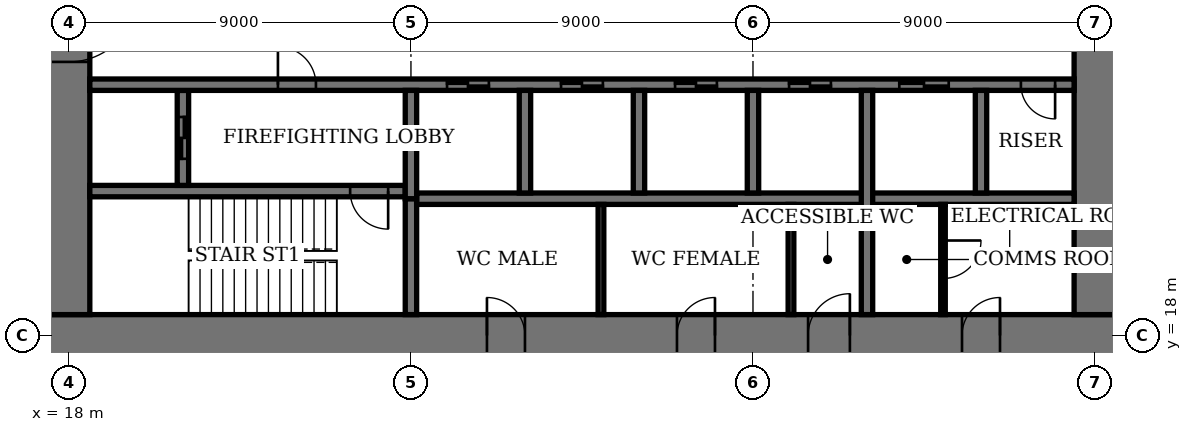
"""IFC4 building model, lengths in metres.
Left out: names, types, materials, properties, quantities, classifications, styles, units other than length and angle.
Written with IfcOpenShell. Run it as: python <this file> out.ifc"""

import sys

from ifc_helpers import new_model, si_unit, direction, frame, frame_2d, origin, place, context, subcontext, project, spatial, rectangle, extrude, element, fill, save


model = new_model("IFC4")
c1 = context("Model", 3, precision=1e-05, world=origin(), true_north=direction((0.0, 1.0)))
c2 = subcontext(c1, "Body", "Model", "MODEL_VIEW")
j1 = project(units=[si_unit("LENGTHUNIT", "METRE"), si_unit("PLANEANGLEUNIT", "RADIAN")], contexts=[c1])
p1 = place(None, origin())
s1 = spatial("IfcSite", under=j1, at=p1, CompositionType="ELEMENT")
p2 = place(p1, origin())
s2 = spatial("IfcBuilding", under=s1, at=p2, CompositionType="ELEMENT")
p3 = place(p2, frame((0.0, 0.0, 31.8)))
s3 = spatial("IfcBuildingStorey", under=s2, at=p3, CompositionType="ELEMENT", Elevation=31.8)
p4 = place(p3, frame((17.45, 18.0, 0.0), z_axis=(0.0, 0.0, 1.0), x_axis=(1.0, 0.0, 0.0)))
e1 = element("IfcWall", 1, at=p4, inside=s3, PredefinedType="SHEAR", context=c2, shape_type="SweptSolid", body=[
    extrude(rectangle(XDim=28.1, YDim=1.1, at=frame_2d((14.05, 0.0))), origin(), (0.0, 0.0, 1.0), 4.0),
])
p5 = place(p4, frame((11.55, 0.0, 0.0)))
e2 = element("IfcOpeningElement", 2, at=p5, cuts=e1, PredefinedType="OPENING", context=c2, shape_type="SweptSolid", body=[
    extrude(rectangle(XDim=1.0, YDim=2.4, at=frame_2d((0.5, 1.2))), frame((0.0, 0.56, 0.0), z_axis=(0.0, -1.0, 0.0), x_axis=(1.0, 0.0, 0.0)), (0.0, 0.0, 1.0), 1.12),
])
p6 = place(p4, frame((16.55, 0.0, 0.0)))
e3 = element("IfcOpeningElement", 3, at=p6, cuts=e1, PredefinedType="OPENING", context=c2, shape_type="SweptSolid", body=[
    extrude(rectangle(XDim=1.0, YDim=2.4, at=frame_2d((0.5, 1.2))), frame((0.0, 0.56, 0.0), z_axis=(0.0, -1.0, 0.0), x_axis=(1.0, 0.0, 0.0)), (0.0, 0.0, 1.0), 1.12),
])
p7 = place(p4, frame((20.0, 0.0, 0.0)))
e4 = element("IfcOpeningElement", 4, at=p7, cuts=e1, PredefinedType="OPENING", context=c2, shape_type="SweptSolid", body=[
    extrude(rectangle(XDim=1.1, YDim=2.4, at=frame_2d((0.55, 1.2))), frame((0.0, 0.56, 0.0), z_axis=(0.0, -1.0, 0.0), x_axis=(1.0, 0.0, 0.0)), (0.0, 0.0, 1.0), 1.12),
])
p8 = place(p4, frame((24.05, 0.0, 0.0)))
e5 = element("IfcOpeningElement", 5, at=p8, cuts=e1, PredefinedType="OPENING", context=c2, shape_type="SweptSolid", body=[
    extrude(rectangle(XDim=1.0, YDim=2.4, at=frame_2d((0.5, 1.2))), frame((0.0, 0.56, 0.0), z_axis=(0.0, -1.0, 0.0), x_axis=(1.0, 0.0, 0.0)), (0.0, 0.0, 1.0), 1.12),
])
p9 = place(p3, frame((18.0, 35.45, 0.0), z_axis=(0.0, 0.0, 1.0), x_axis=(0.0, -1.0, 0.0)))
e6 = element("IfcWall", 6, at=p9, inside=s3, PredefinedType="SHEAR", context=c2, shape_type="SweptSolid", body=[
    extrude(rectangle(XDim=16.9, YDim=1.1, at=frame_2d((8.45, 0.0))), origin(), (0.0, 0.0, 1.0), 4.0),
])
p10 = place(p9, frame((8.45, 0.0, 0.0)))
e7 = element("IfcOpeningElement", 7, at=p10, cuts=e6, PredefinedType="OPENING", context=c2, shape_type="SweptSolid", body=[
    extrude(rectangle(XDim=1.8, YDim=2.4, at=frame_2d((0.9, 1.2))), frame((0.0, 0.56, 0.0), z_axis=(0.0, -1.0, 0.0), x_axis=(1.0, 0.0, 0.0)), (0.0, 0.0, 1.0), 1.12),
])
p11 = place(p3, frame((45.0, 18.55, 0.0), z_axis=(0.0, 0.0, 1.0), x_axis=(0.0, 1.0, 0.0)))
e8 = element("IfcWall", 8, at=p11, inside=s3, PredefinedType="SHEAR", context=c2, shape_type="SweptSolid", body=[
    extrude(rectangle(XDim=16.9, YDim=1.1, at=frame_2d((8.45, 0.0))), origin(), (0.0, 0.0, 1.0), 4.0),
])
p12 = place(p11, frame((8.45, 0.0, 0.0)))
e9 = element("IfcOpeningElement", 9, at=p12, cuts=e8, PredefinedType="OPENING", context=c2, shape_type="SweptSolid", body=[
    extrude(rectangle(XDim=1.8, YDim=2.4, at=frame_2d((0.9, 1.2))), frame((0.0, 0.56, 0.0), z_axis=(0.0, -1.0, 0.0), x_axis=(1.0, 0.0, 0.0)), (0.0, 0.0, 1.0), 1.12),
])
p13 = place(p3, frame((18.55, 21.8, 0.0), z_axis=(0.0, 0.0, 1.0), x_axis=(1.0, 0.0, 0.0)))
e10 = element("IfcWall", 10, at=p13, inside=s3, PredefinedType="SHEAR", context=c2, shape_type="SweptSolid", body=[
    extrude(rectangle(XDim=8.3, YDim=0.3, at=frame_2d((4.15, 0.0))), origin(), (0.0, 0.0, 1.0), 4.0),
])
p14 = place(p13, frame((6.85, 0.0, 0.0)))
e11 = element("IfcOpeningElement", 11, at=p14, cuts=e10, PredefinedType="OPENING", context=c2, shape_type="SweptSolid", body=[
    extrude(rectangle(XDim=1.0, YDim=2.4, at=frame_2d((0.5, 1.2))), frame((0.0, 0.16, 0.0), z_axis=(0.0, -1.0, 0.0), x_axis=(1.0, 0.0, 0.0)), (0.0, 0.0, 1.0), 0.32),
])
p15 = place(p3, frame((27.0, 18.55, 0.0), z_axis=(0.0, 0.0, 1.0), x_axis=(0.0, 1.0, 0.0)))
e12 = element("IfcWall", 12, at=p15, inside=s3, PredefinedType="SHEAR", context=c2, shape_type="SweptSolid", body=[
    extrude(rectangle(XDim=3.05, YDim=0.3, at=frame_2d((1.525, 0.0))), origin(), (0.0, 0.0, 1.0), 4.0),
])
p16 = place(p3, frame((21.0, 21.95, 0.0), z_axis=(0.0, 0.0, 1.0), x_axis=(0.0, 1.0, 0.0)))
e13 = element("IfcWall", 13, at=p16, inside=s3, PredefinedType="SHEAR", context=c2, shape_type="SweptSolid", body=[
    extrude(rectangle(XDim=2.5, YDim=0.3, at=frame_2d((1.25, 0.0))), origin(), (0.0, 0.0, 1.0), 4.0),
])
p17 = place(p16, frame((0.7, 0.0, 0.0)))
e14 = element("IfcOpeningElement", 14, at=p17, cuts=e13, PredefinedType="OPENING", context=c2, shape_type="SweptSolid", body=[
    extrude(rectangle(XDim=1.1, YDim=2.4, at=frame_2d((0.55, 1.2))), frame((0.0, 0.16, 0.0), z_axis=(0.0, -1.0, 0.0), x_axis=(1.0, 0.0, 0.0)), (0.0, 0.0, 1.0), 0.32),
])
p18 = place(p3, frame((18.55, 24.6, 0.0), z_axis=(0.0, 0.0, 1.0), x_axis=(1.0, 0.0, 0.0)))
e15 = element("IfcWall", 15, at=p18, inside=s3, PredefinedType="SHEAR", context=c2, shape_type="SweptSolid", body=[
    extrude(rectangle(XDim=25.9, YDim=0.3, at=frame_2d((12.95, 0.0))), origin(), (0.0, 0.0, 1.0), 4.0),
])
p19 = place(p18, frame((4.95, 0.0, 0.0)))
e16 = element("IfcOpeningElement", 16, at=p19, cuts=e15, PredefinedType="OPENING", context=c2, shape_type="SweptSolid", body=[
    extrude(rectangle(XDim=1.0, YDim=2.4, at=frame_2d((0.5, 1.2))), frame((0.0, 0.16, 0.0), z_axis=(0.0, -1.0, 0.0), x_axis=(1.0, 0.0, 0.0)), (0.0, 0.0, 1.0), 0.32),
])
p20 = place(p18, frame((24.5, 0.0, 0.0)))
e17 = element("IfcOpeningElement", 17, at=p20, cuts=e15, PredefinedType="OPENING", context=c2, shape_type="SweptSolid", body=[
    extrude(rectangle(XDim=0.9, YDim=2.1, at=frame_2d((0.45, 1.05))), frame((0.0, 0.16, 0.0), z_axis=(0.0, -1.0, 0.0), x_axis=(1.0, 0.0, 0.0)), (0.0, 0.0, 1.0), 0.32),
])
p21 = place(p18, frame((9.4, 0.0, 0.0)))
e18 = element("IfcOpeningElement", 18, at=p21, cuts=e15, PredefinedType="OPENING", context=c2, shape_type="SweptSolid", body=[
    extrude(rectangle(XDim=1.1, YDim=2.4, at=frame_2d((0.55, 1.2))), frame((0.0, 0.16, 0.0), z_axis=(0.0, -1.0, 0.0), x_axis=(1.0, 0.0, 0.0)), (0.0, 0.0, 1.0), 0.32),
])
p22 = place(p18, frame((12.4, 0.0, 0.0)))
e19 = element("IfcOpeningElement", 19, at=p22, cuts=e15, PredefinedType="OPENING", context=c2, shape_type="SweptSolid", body=[
    extrude(rectangle(XDim=1.1, YDim=2.4, at=frame_2d((0.55, 1.2))), frame((0.0, 0.16, 0.0), z_axis=(0.0, -1.0, 0.0), x_axis=(1.0, 0.0, 0.0)), (0.0, 0.0, 1.0), 0.32),
])
p23 = place(p18, frame((15.4, 0.0, 0.0)))
e20 = element("IfcOpeningElement", 20, at=p23, cuts=e15, PredefinedType="OPENING", context=c2, shape_type="SweptSolid", body=[
    extrude(rectangle(XDim=1.1, YDim=2.4, at=frame_2d((0.55, 1.2))), frame((0.0, 0.16, 0.0), z_axis=(0.0, -1.0, 0.0), x_axis=(1.0, 0.0, 0.0)), (0.0, 0.0, 1.0), 0.32),
])
p24 = place(p18, frame((18.4, 0.0, 0.0)))
e21 = element("IfcOpeningElement", 21, at=p24, cuts=e15, PredefinedType="OPENING", context=c2, shape_type="SweptSolid", body=[
    extrude(rectangle(XDim=1.1, YDim=2.4, at=frame_2d((0.55, 1.2))), frame((0.0, 0.16, 0.0), z_axis=(0.0, -1.0, 0.0), x_axis=(1.0, 0.0, 0.0)), (0.0, 0.0, 1.0), 0.32),
])
p25 = place(p18, frame((21.3, 0.0, 0.0)))
e22 = element("IfcOpeningElement", 22, at=p25, cuts=e15, PredefinedType="OPENING", context=c2, shape_type="SweptSolid", body=[
    extrude(rectangle(XDim=1.3, YDim=2.4, at=frame_2d((0.65, 1.2))), frame((0.0, 0.16, 0.0), z_axis=(0.0, -1.0, 0.0), x_axis=(1.0, 0.0, 0.0)), (0.0, 0.0, 1.0), 0.32),
])
p26 = place(p3, frame((27.15, 21.6, 0.0), z_axis=(0.0, 0.0, 1.0), x_axis=(1.0, 0.0, 0.0)))
e23 = element("IfcWall", 23, at=p26, inside=s3, PredefinedType="SHEAR", context=c2, shape_type="SweptSolid", body=[
    extrude(rectangle(XDim=17.3, YDim=0.3, at=frame_2d((8.65, 0.0))), origin(), (0.0, 0.0, 1.0), 4.0),
])
for number, where, z_axis, x_axis in (
    (24, (30.0, 21.75, 0.0), (0.0, 0.0, 1.0), (0.0, 1.0, 0.0)),
    (25, (33.0, 21.75, 0.0), (0.0, 0.0, 1.0), (0.0, 1.0, 0.0)),
    (26, (36.0, 21.75, 0.0), (0.0, 0.0, 1.0), (0.0, 1.0, 0.0)),
):
    element("IfcWall", number, at=place(p3, frame(where, z_axis=z_axis, x_axis=x_axis)), inside=s3, PredefinedType="SHEAR", context=c2, shape_type="SweptSolid", body=[
        extrude(rectangle(XDim=2.7, YDim=0.3, at=frame_2d((1.35, 0.0))), origin(), (0.0, 0.0, 1.0), 4.0),
    ])
p27 = place(p3, frame((39.0, 18.55, 0.0), z_axis=(0.0, 0.0, 1.0), x_axis=(0.0, 1.0, 0.0)))
e27 = element("IfcWall", 27, at=p27, inside=s3, PredefinedType="SHEAR", context=c2, shape_type="SweptSolid", body=[
    extrude(rectangle(XDim=5.9, YDim=0.3, at=frame_2d((2.95, 0.0))), origin(), (0.0, 0.0, 1.0), 4.0),
])
p28 = place(p3, frame((42.0, 21.75, 0.0), z_axis=(0.0, 0.0, 1.0), x_axis=(0.0, 1.0, 0.0)))
e28 = element("IfcWall", 28, at=p28, inside=s3, PredefinedType="SHEAR", context=c2, shape_type="SweptSolid", body=[
    extrude(rectangle(XDim=2.7, YDim=0.3, at=frame_2d((1.35, 0.0))), origin(), (0.0, 0.0, 1.0), 4.0),
])
p29 = place(p3, frame((27.0, 21.6, 0.0), z_axis=(0.0, 0.0, 1.0), x_axis=(0.0, 1.0, 0.0)))
e29 = element("IfcWall", 29, at=p29, inside=s3, PredefinedType="SHEAR", context=c2, shape_type="SweptSolid", body=[
    extrude(rectangle(XDim=2.85, YDim=0.3, at=frame_2d((1.425, 0.0))), origin(), (0.0, 0.0, 1.0), 4.0),
])
for number, where, z_axis, x_axis in (
    (30, (32.0, 18.55, 0.0), (0.0, 0.0, 1.0), (0.0, 1.0, 0.0)),
    (31, (37.0, 18.55, 0.0), (0.0, 0.0, 1.0), (0.0, 1.0, 0.0)),
):
    element("IfcWall", number, at=place(p3, frame(where, z_axis=z_axis, x_axis=x_axis)), inside=s3, PredefinedType="PARTITIONING", context=c2, shape_type="SweptSolid", body=[
        extrude(rectangle(XDim=2.9, YDim=0.15, at=frame_2d((1.45, 0.0))), origin(), (0.0, 0.0, 1.0), 3.75),
    ])
p30 = place(p3, frame((41.0, 18.55, 0.0), z_axis=(0.0, 0.0, 1.0), x_axis=(0.0, 1.0, 0.0)))
e32 = element("IfcWall", 32, at=p30, inside=s3, PredefinedType="PARTITIONING", context=c2, shape_type="SweptSolid", body=[
    extrude(rectangle(XDim=2.9, YDim=0.12, at=frame_2d((1.45, 0.0))), origin(), (0.0, 0.0, 1.0), 3.75),
])
p31 = place(p30, frame((0.95, 0.0, 0.0)))
e33 = element("IfcOpeningElement", 33, at=p31, cuts=e32, PredefinedType="OPENING", context=c2, shape_type="SweptSolid", body=[
    extrude(rectangle(XDim=1.0, YDim=2.4, at=frame_2d((0.5, 1.2))), frame((0.0, 0.07, 0.0), z_axis=(0.0, -1.0, 0.0), x_axis=(1.0, 0.0, 0.0)), (0.0, 0.0, 1.0), 0.14),
])
p32 = place(p10, origin())
e34 = element("IfcDoor", 34, at=p32, inside=s3, OperationType="DOUBLE_DOOR_DOUBLE_SWING", PredefinedType="DOOR", context=c2, shape_type="SweptSolid", body=[
    extrude(rectangle(XDim=1.8, YDim=2.4, at=frame_2d((0.9, 1.2))), frame((0.0, 0.03, 0.0), z_axis=(0.0, -1.0, 0.0), x_axis=(1.0, 0.0, 0.0)), (0.0, 0.0, 1.0), 0.06),
    extrude(rectangle(XDim=0.04, YDim=2.4, at=frame_2d((0.02, 1.2))), frame((0.0, 0.55, 0.0), z_axis=(0.0, -1.0, 0.0), x_axis=(1.0, 0.0, 0.0)), (0.0, 0.0, 1.0), 1.1),
    extrude(rectangle(XDim=0.04, YDim=2.4, at=frame_2d((1.78, 1.2))), frame((0.0, 0.55, 0.0), z_axis=(0.0, -1.0, 0.0), x_axis=(1.0, 0.0, 0.0)), (0.0, 0.0, 1.0), 1.1),
    extrude(rectangle(XDim=1.8, YDim=0.04, at=frame_2d((0.9, 2.38))), frame((0.0, 0.55, 0.0), z_axis=(0.0, -1.0, 0.0), x_axis=(1.0, 0.0, 0.0)), (0.0, 0.0, 1.0), 1.1),
])
fill(e7, e34)
p33 = place(p5, origin())
e35 = element("IfcDoor", 35, at=p33, inside=s3, OperationType="SINGLE_SWING_RIGHT", PredefinedType="DOOR", context=c2, shape_type="SweptSolid", body=[
    extrude(rectangle(XDim=1.0, YDim=2.4, at=frame_2d((0.5, 1.2))), frame((0.0, 0.025, 0.0), z_axis=(0.0, -1.0, 0.0), x_axis=(1.0, 0.0, 0.0)), (0.0, 0.0, 1.0), 0.05),
    extrude(rectangle(XDim=0.04, YDim=2.4, at=frame_2d((0.02, 1.2))), frame((0.0, 0.4, 0.0), z_axis=(0.0, -1.0, 0.0), x_axis=(1.0, 0.0, 0.0)), (0.0, 0.0, 1.0), 0.8),
    extrude(rectangle(XDim=0.04, YDim=2.4, at=frame_2d((0.98, 1.2))), frame((0.0, 0.4, 0.0), z_axis=(0.0, -1.0, 0.0), x_axis=(1.0, 0.0, 0.0)), (0.0, 0.0, 1.0), 0.8),
    extrude(rectangle(XDim=1.0, YDim=0.04, at=frame_2d((0.5, 2.38))), frame((0.0, 0.4, 0.0), z_axis=(0.0, -1.0, 0.0), x_axis=(1.0, 0.0, 0.0)), (0.0, 0.0, 1.0), 0.8),
])
fill(e2, e35)
p34 = place(p6, origin())
e36 = element("IfcDoor", 36, at=p34, inside=s3, OperationType="SINGLE_SWING_LEFT", PredefinedType="DOOR", context=c2, shape_type="SweptSolid", body=[
    extrude(rectangle(XDim=1.0, YDim=2.4, at=frame_2d((0.5, 1.2))), frame((0.0, 0.025, 0.0), z_axis=(0.0, -1.0, 0.0), x_axis=(1.0, 0.0, 0.0)), (0.0, 0.0, 1.0), 0.05),
    extrude(rectangle(XDim=0.04, YDim=2.4, at=frame_2d((0.02, 1.2))), frame((0.0, 0.4, 0.0), z_axis=(0.0, -1.0, 0.0), x_axis=(1.0, 0.0, 0.0)), (0.0, 0.0, 1.0), 0.8),
    extrude(rectangle(XDim=0.04, YDim=2.4, at=frame_2d((0.98, 1.2))), frame((0.0, 0.4, 0.0), z_axis=(0.0, -1.0, 0.0), x_axis=(1.0, 0.0, 0.0)), (0.0, 0.0, 1.0), 0.8),
    extrude(rectangle(XDim=1.0, YDim=0.04, at=frame_2d((0.5, 2.38))), frame((0.0, 0.4, 0.0), z_axis=(0.0, -1.0, 0.0), x_axis=(1.0, 0.0, 0.0)), (0.0, 0.0, 1.0), 0.8),
])
fill(e3, e36)
p35 = place(p7, origin())
e37 = element("IfcDoor", 37, at=p35, inside=s3, OperationType="SINGLE_SWING_LEFT", PredefinedType="DOOR", context=c2, shape_type="SweptSolid", body=[
    extrude(rectangle(XDim=1.1, YDim=2.4, at=frame_2d((0.55, 1.2))), frame((0.0, 0.025, 0.0), z_axis=(0.0, -1.0, 0.0), x_axis=(1.0, 0.0, 0.0)), (0.0, 0.0, 1.0), 0.05),
    extrude(rectangle(XDim=0.04, YDim=2.4, at=frame_2d((0.02, 1.2))), frame((0.0, 0.44, 0.0), z_axis=(0.0, -1.0, 0.0), x_axis=(1.0, 0.0, 0.0)), (0.0, 0.0, 1.0), 0.88),
    extrude(rectangle(XDim=0.04, YDim=2.4, at=frame_2d((1.08, 1.2))), frame((0.0, 0.44, 0.0), z_axis=(0.0, -1.0, 0.0), x_axis=(1.0, 0.0, 0.0)), (0.0, 0.0, 1.0), 0.88),
    extrude(rectangle(XDim=1.1, YDim=0.04, at=frame_2d((0.55, 2.38))), frame((0.0, 0.44, 0.0), z_axis=(0.0, -1.0, 0.0), x_axis=(1.0, 0.0, 0.0)), (0.0, 0.0, 1.0), 0.88),
])
fill(e4, e37)
p36 = place(p8, origin())
e38 = element("IfcDoor", 38, at=p36, inside=s3, OperationType="SINGLE_SWING_LEFT", PredefinedType="DOOR", context=c2, shape_type="SweptSolid", body=[
    extrude(rectangle(XDim=1.0, YDim=2.4, at=frame_2d((0.5, 1.2))), frame((0.0, 0.025, 0.0), z_axis=(0.0, -1.0, 0.0), x_axis=(1.0, 0.0, 0.0)), (0.0, 0.0, 1.0), 0.05),
    extrude(rectangle(XDim=0.04, YDim=2.4, at=frame_2d((0.02, 1.2))), frame((0.0, 0.4, 0.0), z_axis=(0.0, -1.0, 0.0), x_axis=(1.0, 0.0, 0.0)), (0.0, 0.0, 1.0), 0.8),
    extrude(rectangle(XDim=0.04, YDim=2.4, at=frame_2d((0.98, 1.2))), frame((0.0, 0.4, 0.0), z_axis=(0.0, -1.0, 0.0), x_axis=(1.0, 0.0, 0.0)), (0.0, 0.0, 1.0), 0.8),
    extrude(rectangle(XDim=1.0, YDim=0.04, at=frame_2d((0.5, 2.38))), frame((0.0, 0.4, 0.0), z_axis=(0.0, -1.0, 0.0), x_axis=(1.0, 0.0, 0.0)), (0.0, 0.0, 1.0), 0.8),
])
fill(e5, e38)
p37 = place(p14, origin())
e39 = element("IfcDoor", 39, at=p37, inside=s3, OperationType="SINGLE_SWING_RIGHT", PredefinedType="DOOR", context=c2, shape_type="SweptSolid", body=[
    extrude(rectangle(XDim=1.0, YDim=2.4, at=frame_2d((0.5, 1.2))), frame((0.0, 0.03, 0.0), z_axis=(0.0, -1.0, 0.0), x_axis=(1.0, 0.0, 0.0)), (0.0, 0.0, 1.0), 0.06),
])
fill(e11, e39)
p38 = place(p19, origin())
e40 = element("IfcDoor", 40, at=p38, inside=s3, OperationType="SINGLE_SWING_RIGHT", PredefinedType="DOOR", context=c2, shape_type="SweptSolid", body=[
    extrude(rectangle(XDim=1.0, YDim=2.4, at=frame_2d((0.5, 1.2))), frame((0.0, 0.03, 0.0), z_axis=(0.0, -1.0, 0.0), x_axis=(1.0, 0.0, 0.0)), (0.0, 0.0, 1.0), 0.06),
])
fill(e16, e40)
p39 = place(p20, origin())
e41 = element("IfcDoor", 41, at=p39, inside=s3, OperationType="SINGLE_SWING_RIGHT", PredefinedType="DOOR", context=c2, shape_type="SweptSolid", body=[
    extrude(rectangle(XDim=0.9, YDim=2.1, at=frame_2d((0.45, 1.05))), frame((0.0, 0.03, 0.0), z_axis=(0.0, -1.0, 0.0), x_axis=(1.0, 0.0, 0.0)), (0.0, 0.0, 1.0), 0.06),
])
fill(e17, e41)
p40 = place(p31, origin())
e42 = element("IfcDoor", 42, at=p40, inside=s3, OperationType="SINGLE_SWING_RIGHT", PredefinedType="DOOR", context=c2, shape_type="SweptSolid", body=[
    extrude(rectangle(XDim=1.0, YDim=2.4, at=frame_2d((0.5, 1.2))), frame((0.0, 0.03, 0.0), z_axis=(0.0, -1.0, 0.0), x_axis=(1.0, 0.0, 0.0)), (0.0, 0.0, 1.0), 0.06),
])
fill(e33, e42)
p41 = place(p21, origin())
e43 = element("IfcDoor", 43, at=p41, inside=s3, OperationType="DOUBLE_DOOR_SLIDING", PredefinedType="DOOR", context=c2, shape_type="SweptSolid", body=[
    extrude(rectangle(XDim=1.1, YDim=2.4, at=frame_2d((0.55, 1.2))), frame((0.0, 0.02, 0.0), z_axis=(0.0, -1.0, 0.0), x_axis=(1.0, 0.0, 0.0)), (0.0, 0.0, 1.0), 0.04),
])
fill(e18, e43)
p42 = place(p22, origin())
e44 = element("IfcDoor", 44, at=p42, inside=s3, OperationType="DOUBLE_DOOR_SLIDING", PredefinedType="DOOR", context=c2, shape_type="SweptSolid", body=[
    extrude(rectangle(XDim=1.1, YDim=2.4, at=frame_2d((0.55, 1.2))), frame((0.0, 0.02, 0.0), z_axis=(0.0, -1.0, 0.0), x_axis=(1.0, 0.0, 0.0)), (0.0, 0.0, 1.0), 0.04),
])
fill(e19, e44)
p43 = place(p23, origin())
e45 = element("IfcDoor", 45, at=p43, inside=s3, OperationType="DOUBLE_DOOR_SLIDING", PredefinedType="DOOR", context=c2, shape_type="SweptSolid", body=[
    extrude(rectangle(XDim=1.1, YDim=2.4, at=frame_2d((0.55, 1.2))), frame((0.0, 0.02, 0.0), z_axis=(0.0, -1.0, 0.0), x_axis=(1.0, 0.0, 0.0)), (0.0, 0.0, 1.0), 0.04),
])
fill(e20, e45)
p44 = place(p24, origin())
e46 = element("IfcDoor", 46, at=p44, inside=s3, OperationType="DOUBLE_DOOR_SLIDING", PredefinedType="DOOR", context=c2, shape_type="SweptSolid", body=[
    extrude(rectangle(XDim=1.1, YDim=2.4, at=frame_2d((0.55, 1.2))), frame((0.0, 0.02, 0.0), z_axis=(0.0, -1.0, 0.0), x_axis=(1.0, 0.0, 0.0)), (0.0, 0.0, 1.0), 0.04),
])
fill(e21, e46)
p45 = place(p25, origin())
e47 = element("IfcDoor", 47, at=p45, inside=s3, OperationType="DOUBLE_DOOR_SLIDING", PredefinedType="DOOR", context=c2, shape_type="SweptSolid", body=[
    extrude(rectangle(XDim=1.3, YDim=2.4, at=frame_2d((0.65, 1.2))), frame((0.0, 0.02, 0.0), z_axis=(0.0, -1.0, 0.0), x_axis=(1.0, 0.0, 0.0)), (0.0, 0.0, 1.0), 0.04),
])
fill(e22, e47)
p46 = place(p17, origin())
e48 = element("IfcDoor", 48, at=p46, inside=s3, OperationType="DOUBLE_DOOR_SLIDING", PredefinedType="DOOR", context=c2, shape_type="SweptSolid", body=[
    extrude(rectangle(XDim=1.1, YDim=2.4, at=frame_2d((0.55, 1.2))), frame((0.0, 0.03, 0.0), z_axis=(0.0, -1.0, 0.0), x_axis=(1.0, 0.0, 0.0)), (0.0, 0.0, 1.0), 0.06),
])
fill(e14, e48)
save(model, sys.argv[1])
